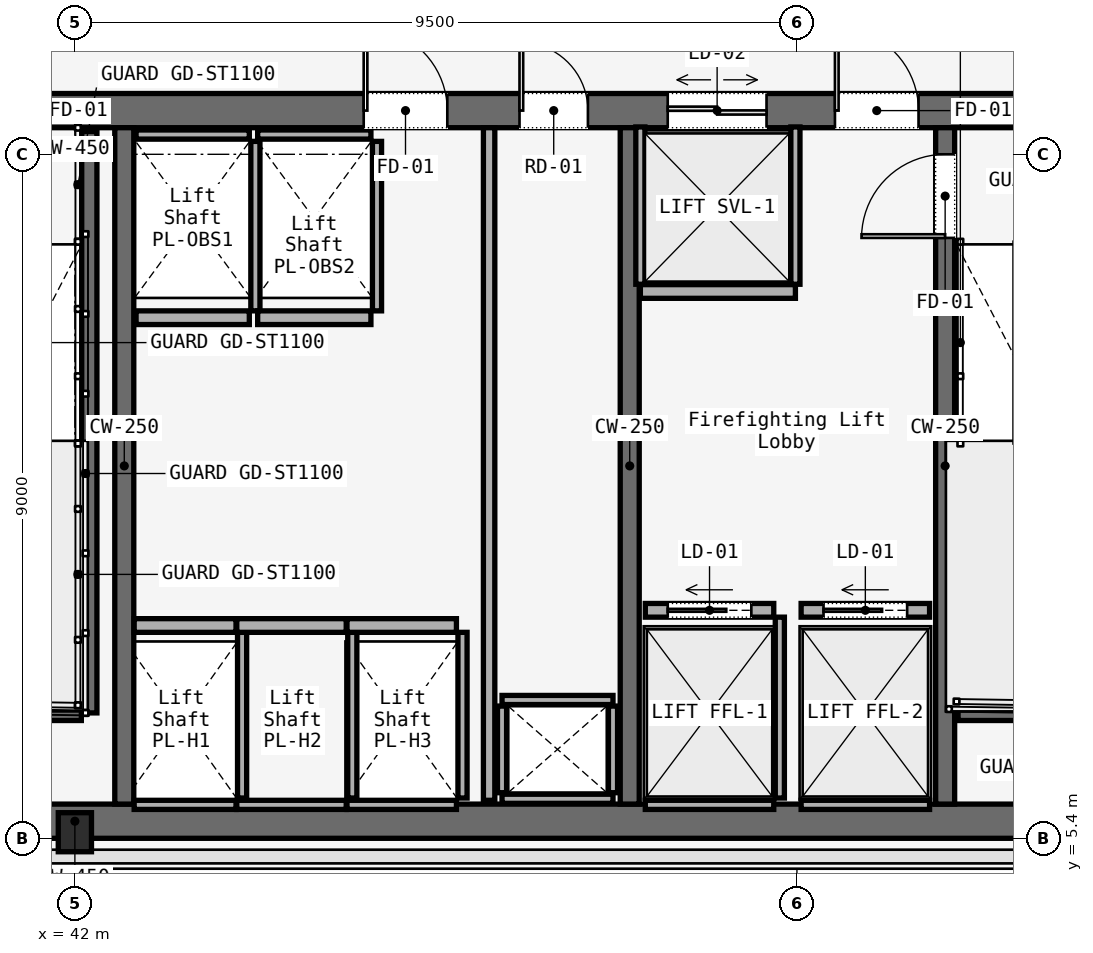
"""IFC4 building model, lengths in metres.
Left out: names, types, materials, properties, quantities, classifications, styles, units other than length and angle.
Written with IfcOpenShell. Run it as: python <this file> out.ifc"""

import sys

from ifc_helpers import new_model, si_unit, direction, frame, frame_2d, origin, origin_2d, place, context, subcontext, project, spatial, rectangle, i_section, extrude, element, fill, save


model = new_model("IFC4")
c1 = context("Model", 3, precision=1e-05, world=origin(), true_north=direction((0.0, 1.0)))
c2 = subcontext(c1, "Body", "Model", "MODEL_VIEW")
j1 = project(units=[si_unit("LENGTHUNIT", "METRE"), si_unit("PLANEANGLEUNIT", "RADIAN")], contexts=[c1])
p1 = place(None, origin())
s1 = spatial("IfcSite", under=j1, at=p1, CompositionType="ELEMENT")
p2 = place(p1, origin())
s2 = spatial("IfcBuilding", under=s1, at=p2, CompositionType="ELEMENT")
p3 = place(p2, frame((0.0, 0.0, 108.2)))
s3 = spatial("IfcBuildingStorey", under=s2, at=p3, CompositionType="ELEMENT", Elevation=108.2)
p4 = place(p3, frame((26.45, 14.975, 0.0), z_axis=(0.0, 0.0, 1.0), x_axis=(1.0, 0.0, 0.0)))
e1 = element("IfcWall", 1, at=p4, inside=s3, PredefinedType="SOLIDWALL", context=c2, shape_type="SweptSolid", body=[
    extrude(rectangle(XDim=31.1, YDim=0.45, at=frame_2d((15.55, 0.0))), origin(), (0.0, 0.0, 1.0), 3.52),
])
p5 = place(p4, frame((1.65, 0.0, 0.0)))
e2 = element("IfcOpeningElement", 2, at=p5, cuts=e1, PredefinedType="OPENING", context=c2, shape_type="SweptSolid", body=[
    extrude(rectangle(XDim=1.1, YDim=2.2, at=frame_2d((0.55, 1.1))), frame((0.0, 0.225, 0.0), z_axis=(0.0, -1.0, 0.0), x_axis=(1.0, 0.0, 0.0)), (0.0, 0.0, 1.0), 0.45),
])
p6 = place(p4, frame((13.65, 0.0, 0.0)))
e3 = element("IfcOpeningElement", 3, at=p6, cuts=e1, PredefinedType="OPENING", context=c2, shape_type="SweptSolid", body=[
    extrude(rectangle(XDim=1.1, YDim=2.2, at=frame_2d((0.55, 1.1))), frame((0.0, 0.225, 0.0), z_axis=(0.0, -1.0, 0.0), x_axis=(1.0, 0.0, 0.0)), (0.0, 0.0, 1.0), 0.45),
])
p7 = place(p4, frame((25.55, 0.0, 0.0)))
e4 = element("IfcOpeningElement", 4, at=p7, cuts=e1, PredefinedType="OPENING", context=c2, shape_type="SweptSolid", body=[
    extrude(rectangle(XDim=1.1, YDim=2.2, at=frame_2d((0.55, 1.1))), frame((0.0, 0.225, 0.0), z_axis=(0.0, -1.0, 0.0), x_axis=(1.0, 0.0, 0.0)), (0.0, 0.0, 1.0), 0.45),
])
p8 = place(p4, frame((10.7, 0.0, 0.0)))
e5 = element("IfcOpeningElement", 5, at=p8, cuts=e1, PredefinedType="OPENING", context=c2, shape_type="SweptSolid", body=[
    extrude(rectangle(XDim=1.4, YDim=2.2, at=frame_2d((0.7, 1.1))), frame((0.0, 0.225, 0.0), z_axis=(0.0, -1.0, 0.0), x_axis=(1.0, 0.0, 0.0)), (0.0, 0.0, 1.0), 0.45),
])
p9 = place(p4, frame((19.35, 0.0, 0.0)))
e6 = element("IfcOpeningElement", 6, at=p9, cuts=e1, PredefinedType="OPENING", context=c2, shape_type="SweptSolid", body=[
    extrude(rectangle(XDim=1.1, YDim=2.2, at=frame_2d((0.55, 1.1))), frame((0.0, 0.225, 0.0), z_axis=(0.0, -1.0, 0.0), x_axis=(1.0, 0.0, 0.0)), (0.0, 0.0, 1.0), 0.45),
])
p10 = place(p4, frame((21.4, 0.0, 0.0)))
e7 = element("IfcOpeningElement", 7, at=p10, cuts=e1, PredefinedType="OPENING", context=c2, shape_type="SweptSolid", body=[
    extrude(rectangle(XDim=0.9, YDim=2.1, at=frame_2d((0.45, 1.05))), frame((0.0, 0.225, 0.0), z_axis=(0.0, -1.0, 0.0), x_axis=(1.0, 0.0, 0.0)), (0.0, 0.0, 1.0), 0.45),
])
p11 = place(p4, frame((23.35, 0.0, 0.0)))
e8 = element("IfcOpeningElement", 8, at=p11, cuts=e1, PredefinedType="OPENING", context=c2, shape_type="SweptSolid", body=[
    extrude(rectangle(XDim=1.3, YDim=2.3, at=frame_2d((0.65, 1.15))), frame((0.0, 0.225, 0.0), z_axis=(0.0, -1.0, 0.0), x_axis=(1.0, 0.0, 0.0)), (0.0, 0.0, 1.0), 0.45),
])
p12 = place(p3, frame((26.45, 5.625, 0.0), z_axis=(0.0, 0.0, 1.0), x_axis=(1.0, 0.0, 0.0)))
e9 = element("IfcWall", 9, at=p12, inside=s3, PredefinedType="SOLIDWALL", context=c2, shape_type="SweptSolid", body=[
    extrude(rectangle(XDim=31.1, YDim=0.45, at=frame_2d((15.55, 0.0))), origin(), (0.0, 0.0, 1.0), 3.52),
])
for number, where, z_axis, x_axis in (
    (10, (42.65, 5.85, 0.0), (0.0, 0.0, 1.0), (0.0, 1.0, 0.0)),
    (11, (49.3, 5.85, 0.0), (0.0, 0.0, 1.0), (0.0, 1.0, 0.0)),
):
    element("IfcWall", number, at=place(p3, frame(where, z_axis=z_axis, x_axis=x_axis)), inside=s3, PredefinedType="SOLIDWALL", context=c2, shape_type="SweptSolid", body=[
        extrude(rectangle(XDim=8.9, YDim=0.25, at=frame_2d((4.45, 0.0))), origin(), (0.0, 0.0, 1.0), 3.52),
    ])
p13 = place(p3, frame((53.45, 5.85, 0.0), z_axis=(0.0, 0.0, 1.0), x_axis=(0.0, 1.0, 0.0)))
e12 = element("IfcWall", 12, at=p13, inside=s3, PredefinedType="SOLIDWALL", context=c2, shape_type="SweptSolid", body=[
    extrude(rectangle(XDim=8.9, YDim=0.25, at=frame_2d((4.45, 0.0))), origin(), (0.0, 0.0, 1.0), 3.52),
])
p14 = place(p13, frame((7.45, 0.0, 0.0)))
e13 = element("IfcOpeningElement", 13, at=p14, cuts=e12, PredefinedType="OPENING", context=c2, shape_type="SweptSolid", body=[
    extrude(rectangle(XDim=1.1, YDim=2.2, at=frame_2d((0.55, 1.1))), frame((0.0, 0.125, 0.0), z_axis=(0.0, -1.0, 0.0), x_axis=(1.0, 0.0, 0.0)), (0.0, 0.0, 1.0), 0.25),
])
p15 = place(p3, frame((42.0, 5.48, 0.0), z_axis=(0.0, 0.0, 1.0), x_axis=(1.0, 0.0, 0.0)))
e14 = element("IfcColumn", 14, at=p15, inside=s3, PredefinedType="COLUMN", context=c2, shape_type="SweptSolid", body=[
    extrude(i_section(OverallWidth=0.437, OverallDepth=0.514, WebThickness=0.061, FlangeThickness=0.077, FilletRadius=0.015, at=origin_2d()), origin(), (0.0, 0.0, 1.0), 3.52),
])
p16 = place(p3, frame((42.19, 14.7, 0.0), z_axis=(0.0, 0.0, 1.0), x_axis=(0.0, -1.0, 0.0)))
e15 = element("IfcWall", 15, at=p16, inside=s3, PredefinedType="SOLIDWALL", context=c2, shape_type="SweptSolid", body=[
    extrude(rectangle(XDim=7.65, YDim=0.2, at=frame_2d((3.825, 0.0))), origin(), (0.0, 0.0, 1.0), 3.8),
])
for number, where, z_axis, x_axis in (
    (16, (38.97, 7.05, 0.0), (0.0, 0.0, 1.0), (1.0, 0.0, 0.0)),
    (17, (53.62, 7.05, 0.0), (0.0, 0.0, 1.0), (1.0, 0.0, 0.0)),
):
    element("IfcWall", number, at=place(p3, frame(where, z_axis=z_axis, x_axis=x_axis)), inside=s3, PredefinedType="SOLIDWALL", context=c2, shape_type="SweptSolid", body=[
        extrude(rectangle(XDim=3.115, YDim=0.2, at=frame_2d((1.558, 0.0))), origin(), (0.0, 0.0, 1.0), 3.8),
    ])
for number, where, z_axis, x_axis in (
    (18, (47.62, 5.92, 0.0), (0.0, 0.0, 1.0), (1.0, 0.0, 0.0)),
    (19, (47.62, 7.22, 0.0), (0.0, 0.0, 1.0), (1.0, 0.0, 0.0)),
):
    element("IfcWall", number, at=place(p3, frame(where, z_axis=z_axis, x_axis=x_axis)), inside=s3, PredefinedType="SOLIDWALL", context=c2, shape_type="SweptSolid", body=[
        extrude(rectangle(XDim=1.46, YDim=0.12, at=frame_2d((0.73, 0.0))), origin(), (0.0, 0.0, 1.0), 2.95),
    ])
for number, where, z_axis, x_axis in (
    (20, (47.62, 6.0, 0.0), (0.0, 0.0, 1.0), (0.0, 1.0, 0.0)),
    (21, (49.08, 6.0, 0.0), (0.0, 0.0, 1.0), (0.0, 1.0, 0.0)),
):
    element("IfcWall", number, at=place(p3, frame(where, z_axis=z_axis, x_axis=x_axis)), inside=s3, PredefinedType="SOLIDWALL", context=c2, shape_type="SweptSolid", body=[
        extrude(rectangle(XDim=1.14, YDim=0.12, at=frame_2d((0.57, 0.0))), origin(), (0.0, 0.0, 1.0), 2.95),
    ])
p17 = place(p3, frame((47.45, 5.9, 0.0), z_axis=(0.0, 0.0, 1.0), x_axis=(0.0, 1.0, 0.0)))
e22 = element("IfcWall", 22, at=p17, inside=s3, PredefinedType="PARTITIONING", context=c2, shape_type="SweptSolid", body=[
    extrude(rectangle(XDim=8.85, YDim=0.15, at=frame_2d((4.425, 0.0))), origin(), (0.0, 0.0, 1.0), 2.95),
])
p18 = place(p3, frame((42.78, 8.2, 0.0), z_axis=(0.0, 0.0, 1.0), x_axis=(1.0, 0.0, 0.0)))
e23 = element("IfcWall", 23, at=p18, inside=s3, PredefinedType="SOLIDWALL", context=c2, shape_type="SweptSolid", body=[
    extrude(rectangle(XDim=1.34, YDim=0.18, at=frame_2d((0.67, 0.0))), origin(), (0.0, 0.0, 1.0), 2.95),
])
p19 = place(p3, frame((42.78, 5.84, 0.0), z_axis=(0.0, 0.0, 1.0), x_axis=(1.0, 0.0, 0.0)))
e24 = element("IfcWall", 24, at=p19, inside=s3, PredefinedType="SOLIDWALL", context=c2, shape_type="SweptSolid", body=[
    extrude(rectangle(XDim=1.34, YDim=0.12, at=frame_2d((0.67, 0.0))), origin(), (0.0, 0.0, 1.0), 2.95),
])
p20 = place(p3, frame((44.2, 5.93, 0.0), z_axis=(0.0, 0.0, 1.0), x_axis=(0.0, 1.0, 0.0)))
e25 = element("IfcWall", 25, at=p20, inside=s3, PredefinedType="SOLIDWALL", context=c2, shape_type="SweptSolid", body=[
    extrude(rectangle(XDim=2.18, YDim=0.12, at=frame_2d((1.09, 0.0))), origin(), (0.0, 0.0, 1.0), 2.95),
])
p21 = place(p3, frame((44.13, 8.2, 0.0), z_axis=(0.0, 0.0, 1.0), x_axis=(1.0, 0.0, 0.0)))
e26 = element("IfcWall", 26, at=p21, inside=s3, PredefinedType="SOLIDWALL", context=c2, shape_type="SweptSolid", body=[
    extrude(rectangle(XDim=1.44, YDim=0.18, at=frame_2d((0.72, 0.0))), origin(), (0.0, 0.0, 1.0), 2.95),
])
p22 = place(p3, frame((44.13, 5.84, 0.0), z_axis=(0.0, 0.0, 1.0), x_axis=(1.0, 0.0, 0.0)))
e27 = element("IfcWall", 27, at=p22, inside=s3, PredefinedType="SOLIDWALL", context=c2, shape_type="SweptSolid", body=[
    extrude(rectangle(XDim=1.44, YDim=0.12, at=frame_2d((0.72, 0.0))), origin(), (0.0, 0.0, 1.0), 2.95),
])
p23 = place(p3, frame((45.65, 5.93, 0.0), z_axis=(0.0, 0.0, 1.0), x_axis=(0.0, 1.0, 0.0)))
e28 = element("IfcWall", 28, at=p23, inside=s3, PredefinedType="SOLIDWALL", context=c2, shape_type="SweptSolid", body=[
    extrude(rectangle(XDim=2.18, YDim=0.12, at=frame_2d((1.09, 0.0))), origin(), (0.0, 0.0, 1.0), 2.95),
])
p24 = place(p3, frame((45.58, 8.2, 0.0), z_axis=(0.0, 0.0, 1.0), x_axis=(1.0, 0.0, 0.0)))
e29 = element("IfcWall", 29, at=p24, inside=s3, PredefinedType="SOLIDWALL", context=c2, shape_type="SweptSolid", body=[
    extrude(rectangle(XDim=1.44, YDim=0.18, at=frame_2d((0.72, 0.0))), origin(), (0.0, 0.0, 1.0), 2.95),
])
p25 = place(p3, frame((45.58, 5.84, 0.0), z_axis=(0.0, 0.0, 1.0), x_axis=(1.0, 0.0, 0.0)))
e30 = element("IfcWall", 30, at=p25, inside=s3, PredefinedType="SOLIDWALL", context=c2, shape_type="SweptSolid", body=[
    extrude(rectangle(XDim=1.44, YDim=0.12, at=frame_2d((0.72, 0.0))), origin(), (0.0, 0.0, 1.0), 2.95),
])
p26 = place(p3, frame((47.1, 5.93, 0.0), z_axis=(0.0, 0.0, 1.0), x_axis=(0.0, 1.0, 0.0)))
e31 = element("IfcWall", 31, at=p26, inside=s3, PredefinedType="SOLIDWALL", context=c2, shape_type="SweptSolid", body=[
    extrude(rectangle(XDim=2.18, YDim=0.12, at=frame_2d((1.09, 0.0))), origin(), (0.0, 0.0, 1.0), 2.95),
])
p27 = place(p3, frame((42.805, 12.25, 0.0), z_axis=(0.0, 0.0, 1.0), x_axis=(1.0, 0.0, 0.0)))
e32 = element("IfcWall", 32, at=p27, inside=s3, PredefinedType="SOLIDWALL", context=c2, shape_type="SweptSolid", body=[
    extrude(rectangle(XDim=1.49, YDim=0.18, at=frame_2d((0.745, 0.0))), origin(), (0.0, 0.0, 1.0), 2.95),
])
p28 = place(p3, frame((42.805, 14.66, 0.0), z_axis=(0.0, 0.0, 1.0), x_axis=(1.0, 0.0, 0.0)))
e33 = element("IfcWall", 33, at=p28, inside=s3, PredefinedType="SOLIDWALL", context=c2, shape_type="SweptSolid", body=[
    extrude(rectangle(XDim=1.49, YDim=0.12, at=frame_2d((0.745, 0.0))), origin(), (0.0, 0.0, 1.0), 2.95),
])
p29 = place(p3, frame((44.375, 12.34, 0.0), z_axis=(0.0, 0.0, 1.0), x_axis=(0.0, 1.0, 0.0)))
e34 = element("IfcWall", 34, at=p29, inside=s3, PredefinedType="SOLIDWALL", context=c2, shape_type="SweptSolid", body=[
    extrude(rectangle(XDim=2.23, YDim=0.12, at=frame_2d((1.115, 0.0))), origin(), (0.0, 0.0, 1.0), 2.95),
])
p30 = place(p3, frame((44.405, 12.25, 0.0), z_axis=(0.0, 0.0, 1.0), x_axis=(1.0, 0.0, 0.0)))
e35 = element("IfcWall", 35, at=p30, inside=s3, PredefinedType="SOLIDWALL", context=c2, shape_type="SweptSolid", body=[
    extrude(rectangle(XDim=1.49, YDim=0.18, at=frame_2d((0.745, 0.0))), origin(), (0.0, 0.0, 1.0), 2.95),
])
p31 = place(p3, frame((44.405, 14.66, 0.0), z_axis=(0.0, 0.0, 1.0), x_axis=(1.0, 0.0, 0.0)))
e36 = element("IfcWall", 36, at=p31, inside=s3, PredefinedType="SOLIDWALL", context=c2, shape_type="SweptSolid", body=[
    extrude(rectangle(XDim=1.49, YDim=0.12, at=frame_2d((0.745, 0.0))), origin(), (0.0, 0.0, 1.0), 2.95),
])
p32 = place(p3, frame((45.975, 12.34, 0.0), z_axis=(0.0, 0.0, 1.0), x_axis=(0.0, 1.0, 0.0)))
e37 = element("IfcWall", 37, at=p32, inside=s3, PredefinedType="SOLIDWALL", context=c2, shape_type="SweptSolid", body=[
    extrude(rectangle(XDim=2.23, YDim=0.12, at=frame_2d((1.115, 0.0))), origin(), (0.0, 0.0, 1.0), 2.95),
])
p33 = place(p3, frame((49.505, 8.4, 0.0), z_axis=(0.0, 0.0, 1.0), x_axis=(1.0, 0.0, 0.0)))
e38 = element("IfcWall", 38, at=p33, inside=s3, PredefinedType="SOLIDWALL", context=c2, shape_type="SweptSolid", body=[
    extrude(rectangle(XDim=1.69, YDim=0.18, at=frame_2d((0.845, 0.0))), origin(), (0.0, 0.0, 1.0), 2.95),
])
p34 = place(p33, frame((0.295, 0.0, 0.0)))
e39 = element("IfcOpeningElement", 39, at=p34, cuts=e38, PredefinedType="OPENING", context=c2, shape_type="SweptSolid", body=[
    extrude(rectangle(XDim=1.1, YDim=2.2, at=frame_2d((0.55, 1.1))), frame((0.0, 0.09, 0.0), z_axis=(0.0, -1.0, 0.0), x_axis=(1.0, 0.0, 0.0)), (0.0, 0.0, 1.0), 0.18),
])
p35 = place(p3, frame((49.505, 5.84, 0.0), z_axis=(0.0, 0.0, 1.0), x_axis=(1.0, 0.0, 0.0)))
e40 = element("IfcWall", 40, at=p35, inside=s3, PredefinedType="SOLIDWALL", context=c2, shape_type="SweptSolid", body=[
    extrude(rectangle(XDim=1.69, YDim=0.12, at=frame_2d((0.845, 0.0))), origin(), (0.0, 0.0, 1.0), 2.95),
])
p36 = place(p3, frame((51.275, 5.93, 0.0), z_axis=(0.0, 0.0, 1.0), x_axis=(0.0, 1.0, 0.0)))
e41 = element("IfcWall", 41, at=p36, inside=s3, PredefinedType="SOLIDWALL", context=c2, shape_type="SweptSolid", body=[
    extrude(rectangle(XDim=2.38, YDim=0.12, at=frame_2d((1.19, 0.0))), origin(), (0.0, 0.0, 1.0), 2.95),
])
p37 = place(p3, frame((51.555, 8.4, 0.0), z_axis=(0.0, 0.0, 1.0), x_axis=(1.0, 0.0, 0.0)))
e42 = element("IfcWall", 42, at=p37, inside=s3, PredefinedType="SOLIDWALL", context=c2, shape_type="SweptSolid", body=[
    extrude(rectangle(XDim=1.69, YDim=0.18, at=frame_2d((0.845, 0.0))), origin(), (0.0, 0.0, 1.0), 2.95),
])
p38 = place(p37, frame((0.295, 0.0, 0.0)))
e43 = element("IfcOpeningElement", 43, at=p38, cuts=e42, PredefinedType="OPENING", context=c2, shape_type="SweptSolid", body=[
    extrude(rectangle(XDim=1.1, YDim=2.2, at=frame_2d((0.55, 1.1))), frame((0.0, 0.09, 0.0), z_axis=(0.0, -1.0, 0.0), x_axis=(1.0, 0.0, 0.0)), (0.0, 0.0, 1.0), 0.18),
])
p39 = place(p3, frame((51.555, 5.84, 0.0), z_axis=(0.0, 0.0, 1.0), x_axis=(1.0, 0.0, 0.0)))
e44 = element("IfcWall", 44, at=p39, inside=s3, PredefinedType="SOLIDWALL", context=c2, shape_type="SweptSolid", body=[
    extrude(rectangle(XDim=1.69, YDim=0.12, at=frame_2d((0.845, 0.0))), origin(), (0.0, 0.0, 1.0), 2.95),
])
p40 = place(p3, frame((49.44, 12.595, 0.0), z_axis=(0.0, 0.0, 1.0), x_axis=(1.0, 0.0, 0.0)))
e45 = element("IfcWall", 45, at=p40, inside=s3, PredefinedType="SOLIDWALL", context=c2, shape_type="SweptSolid", body=[
    extrude(rectangle(XDim=2.04, YDim=0.18, at=frame_2d((1.02, 0.0))), origin(), (0.0, 0.0, 1.0), 2.95),
])
for number, where, z_axis, x_axis in (
    (46, (49.44, 12.69, 0.0), (0.0, 0.0, 1.0), (0.0, 1.0, 0.0)),
    (47, (51.48, 12.69, 0.0), (0.0, 0.0, 1.0), (0.0, 1.0, 0.0)),
):
    element("IfcWall", number, at=place(p3, frame(where, z_axis=z_axis, x_axis=x_axis)), inside=s3, PredefinedType="SOLIDWALL", context=c2, shape_type="SweptSolid", body=[
        extrude(rectangle(XDim=2.07, YDim=0.12, at=frame_2d((1.035, 0.0))), origin(), (0.0, 0.0, 1.0), 2.95),
    ])
p41 = place(p7, origin())
e48 = element("IfcDoor", 48, at=p41, inside=s3, OperationType="SINGLE_SWING_RIGHT", PredefinedType="DOOR", context=c2, shape_type="SweptSolid", body=[
    extrude(rectangle(XDim=1.1, YDim=2.2, at=frame_2d((0.55, 1.1))), frame((0.0, 0.025, 0.0), z_axis=(0.0, -1.0, 0.0), x_axis=(1.0, 0.0, 0.0)), (0.0, 0.0, 1.0), 0.05),
])
fill(e4, e48)
p42 = place(p9, origin())
e49 = element("IfcDoor", 49, at=p42, inside=s3, OperationType="SINGLE_SWING_LEFT", PredefinedType="DOOR", context=c2, shape_type="SweptSolid", body=[
    extrude(rectangle(XDim=1.1, YDim=2.2, at=frame_2d((0.55, 1.1))), frame((0.0, 0.025, 0.0), z_axis=(0.0, -1.0, 0.0), x_axis=(1.0, 0.0, 0.0)), (0.0, 0.0, 1.0), 0.05),
])
fill(e6, e49)
p43 = place(p10, origin())
e50 = element("IfcDoor", 50, at=p43, inside=s3, OperationType="SINGLE_SWING_LEFT", PredefinedType="DOOR", context=c2, shape_type="SweptSolid", body=[
    extrude(rectangle(XDim=0.9, YDim=2.1, at=frame_2d((0.45, 1.05))), frame((0.0, 0.025, 0.0), z_axis=(0.0, -1.0, 0.0), x_axis=(1.0, 0.0, 0.0)), (0.0, 0.0, 1.0), 0.05),
])
fill(e7, e50)
p44 = place(p14, origin())
e51 = element("IfcDoor", 51, at=p44, inside=s3, OperationType="SINGLE_SWING_LEFT", PredefinedType="DOOR", context=c2, shape_type="SweptSolid", body=[
    extrude(rectangle(XDim=1.1, YDim=2.2, at=frame_2d((0.55, 1.1))), frame((0.0, 0.025, 0.0), z_axis=(0.0, -1.0, 0.0), x_axis=(1.0, 0.0, 0.0)), (0.0, 0.0, 1.0), 0.05),
])
fill(e13, e51)
p45 = place(p34, origin())
e52 = element("IfcDoor", 52, at=p45, inside=s3, OperationType="SLIDING_TO_LEFT", PredefinedType="DOOR", context=c2, shape_type="SweptSolid", body=[
    extrude(rectangle(XDim=1.1, YDim=2.2, at=frame_2d((0.55, 1.1))), frame((0.0, 0.025, 0.0), z_axis=(0.0, -1.0, 0.0), x_axis=(1.0, 0.0, 0.0)), (0.0, 0.0, 1.0), 0.05),
])
fill(e39, e52)
p46 = place(p38, origin())
e53 = element("IfcDoor", 53, at=p46, inside=s3, OperationType="SLIDING_TO_LEFT", PredefinedType="DOOR", context=c2, shape_type="SweptSolid", body=[
    extrude(rectangle(XDim=1.1, YDim=2.2, at=frame_2d((0.55, 1.1))), frame((0.0, 0.025, 0.0), z_axis=(0.0, -1.0, 0.0), x_axis=(1.0, 0.0, 0.0)), (0.0, 0.0, 1.0), 0.05),
])
fill(e43, e53)
p47 = place(p11, origin())
e54 = element("IfcDoor", 54, at=p47, inside=s3, OperationType="DOUBLE_DOOR_SLIDING", PredefinedType="DOOR", context=c2, shape_type="SweptSolid", body=[
    extrude(rectangle(XDim=1.3, YDim=2.3, at=frame_2d((0.65, 1.15))), frame((0.0, 0.025, 0.0), z_axis=(0.0, -1.0, 0.0), x_axis=(1.0, 0.0, 0.0)), (0.0, 0.0, 1.0), 0.05),
])
fill(e8, e54)
save(model, sys.argv[1])
